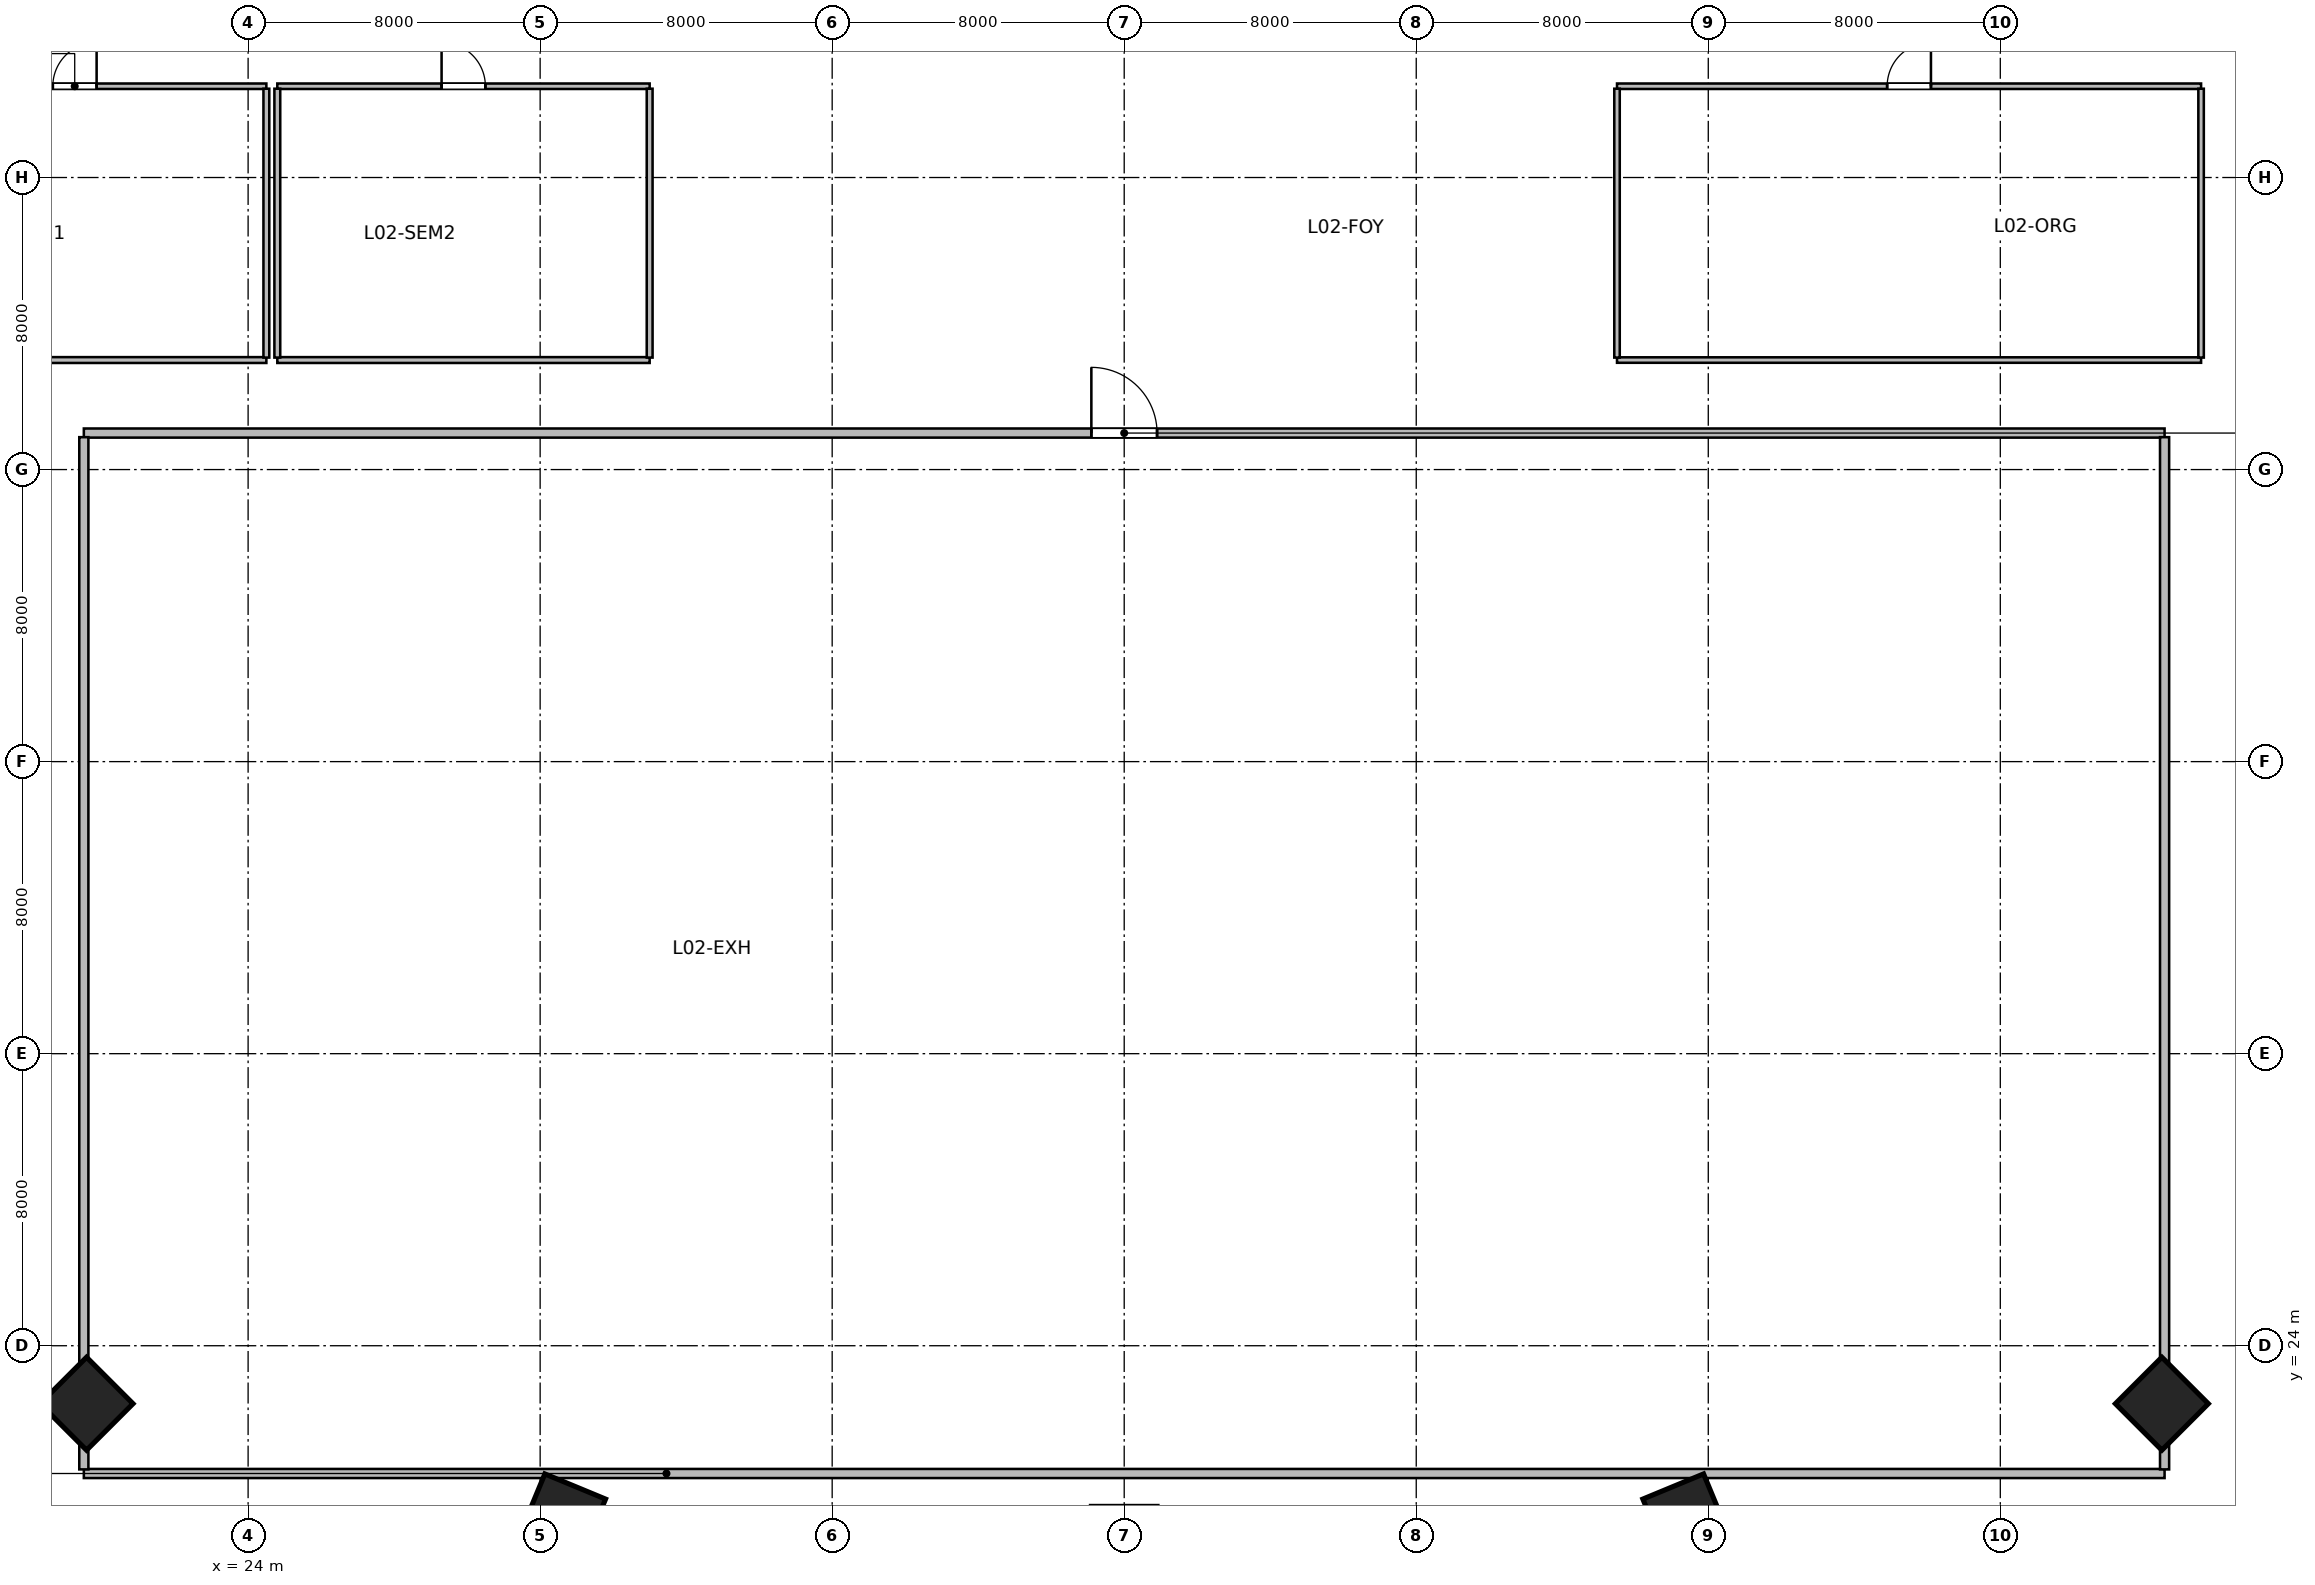
"""IFC4 building model, lengths in metres.
Left out: names, types, materials, properties, quantities, classifications, styles, units other than length and angle.
Written with IfcOpenShell. Run it as: python <this file> out.ifc"""

import sys

from ifc_helpers import new_model, si_unit, direction, frame, frame_2d, origin, origin_2d, place, context, subcontext, project, spatial, rectangle, extrude, source, transform, mapped, element, fill, save


model = new_model("IFC4")
c1 = context("Model", 3, precision=1e-05, world=origin(), true_north=direction((0.0, 1.0)))
c2 = subcontext(c1, "Body", "Model", "MODEL_VIEW")
j1 = project(units=[si_unit("LENGTHUNIT", "METRE"), si_unit("PLANEANGLEUNIT", "RADIAN")], contexts=[c1])
p1 = place(None, origin())
s1 = spatial("IfcSite", under=j1, at=p1, CompositionType="ELEMENT")
p2 = place(p1, origin())
s2 = spatial("IfcBuilding", under=s1, at=p2, CompositionType="ELEMENT")
p3 = place(p2, frame((0.0, 0.0, 12.0)))
s3 = spatial("IfcBuildingStorey", under=s2, at=p3, CompositionType="ELEMENT", Elevation=12.0)
m1 = source(origin(), c2, "Body", "SweptSolid", [
    extrude(rectangle(XDim=1.8, YDim=1.8, at=origin_2d()), origin(), (0.0, 0.0, 1.0), 6.0),
])
for number, where, z_axis, x_axis in (
    (1, (19.574, 22.412, 0.0), (0.0, 0.0, 1.0), (-0.707, -0.707, 0.0)),
    (2, (32.616, 19.312, 0.0), (0.0, 0.0, 1.0), (-0.383, -0.924, 0.0)),
    (3, (63.384, 19.312, 0.0), (0.0, 0.0, 1.0), (0.383, -0.924, 0.0)),
    (4, (76.426, 22.412, 0.0), (0.0, 0.0, 1.0), (0.707, -0.707, 0.0)),
):
    element("IfcColumn", number, at=place(p3, frame(where, z_axis=z_axis, x_axis=x_axis)), inside=s3, PredefinedType="COLUMN", context=c2, shape_type="MappedRepresentation", body=[
        mapped(m1, transform((0.0, 0.0, 0.0), scale=1.0)),
    ])
m2 = source(origin(), c2, "Body", "SweptSolid", [
    extrude(rectangle(XDim=57.0, YDim=0.25, at=frame_2d((28.5, 0.0))), origin(), (0.0, 0.0, 1.0), 4.761),
])
p4 = place(p3, frame((19.5, 20.5, 0.0), z_axis=(0.0, 0.0, 1.0), x_axis=(1.0, 0.0, 0.0)))
e5 = element("IfcWall", 5, at=p4, inside=s3, PredefinedType="PARTITIONING", context=c2, shape_type="MappedRepresentation", body=[
    mapped(m2, transform((0.0, 0.0, 0.0), scale=1.0)),
])
m3 = source(origin(), c2, "Body", "SweptSolid", [
    extrude(rectangle(XDim=57.0, YDim=0.25, at=frame_2d((28.5, 0.0))), origin(), (0.0, 0.0, 1.0), 5.7),
])
p5 = place(p3, frame((19.5, 49.0, 0.0), z_axis=(0.0, 0.0, 1.0), x_axis=(1.0, 0.0, 0.0)))
e6 = element("IfcWall", 6, at=p5, inside=s3, PredefinedType="PARTITIONING", context=c2, shape_type="MappedRepresentation", body=[
    mapped(m3, transform((0.0, 0.0, 0.0), scale=1.0)),
])
p6 = place(p5, frame((27.6, 0.0, 0.0)))
e7 = element("IfcOpeningElement", 7, at=p6, cuts=e6, PredefinedType="OPENING", context=c2, shape_type="SweptSolid", body=[
    extrude(rectangle(XDim=1.8, YDim=2.15, at=frame_2d((0.9, 1.075))), frame((0.0, 0.135, 0.0), z_axis=(0.0, -1.0, 0.0), x_axis=(1.0, 0.0, 0.0)), (0.0, 0.0, 1.0), 0.27),
])
m4 = source(origin(), c2, "Body", "SweptSolid", [
    extrude(rectangle(XDim=28.275, YDim=0.25, at=frame_2d((14.137, 0.0))), origin(), (0.0, 0.0, 1.0), 5.7),
])
for number, where, z_axis, x_axis in (
    (8, (19.5, 20.613, 0.0), (0.0, 0.0, 1.0), (0.0, 1.0, 0.0)),
    (9, (76.5, 20.613, 0.0), (0.0, 0.0, 1.0), (0.0, 1.0, 0.0)),
):
    element("IfcWall", number, at=place(p3, frame(where, z_axis=z_axis, x_axis=x_axis)), inside=s3, PredefinedType="PARTITIONING", context=c2, shape_type="MappedRepresentation", body=[
        mapped(m4, transform((0.0, 0.0, 0.0), scale=1.0)),
    ])
m5 = source(origin(), c2, "Body", "SweptSolid", [
    extrude(rectangle(XDim=10.5, YDim=0.16, at=frame_2d((5.25, 0.0))), origin(), (0.0, 0.0, 1.0), 5.7),
])
p7 = place(p3, frame((14.0, 51.0, 0.0), z_axis=(0.0, 0.0, 1.0), x_axis=(1.0, 0.0, 0.0)))
e10 = element("IfcWall", 10, at=p7, inside=s3, PredefinedType="MOVABLE", context=c2, shape_type="MappedRepresentation", body=[
    mapped(m5, transform((0.0, 0.0, 0.0), scale=1.0)),
])
m6 = source(origin(), c2, "Body", "SweptSolid", [
    extrude(rectangle(XDim=10.5, YDim=0.15, at=frame_2d((5.25, 0.0))), origin(), (0.0, 0.0, 1.0), 5.7),
])
p8 = place(p3, frame((14.0, 58.5, 0.0), z_axis=(0.0, 0.0, 1.0), x_axis=(1.0, 0.0, 0.0)))
e11 = element("IfcWall", 11, at=p8, inside=s3, PredefinedType="PARTITIONING", context=c2, shape_type="MappedRepresentation", body=[
    mapped(m6, transform((0.0, 0.0, 0.0), scale=1.0)),
])
p9 = place(p8, frame((4.65, 0.0, 0.0)))
e12 = element("IfcOpeningElement", 12, at=p9, cuts=e11, PredefinedType="OPENING", context=c2, shape_type="SweptSolid", body=[
    extrude(rectangle(XDim=1.2, YDim=2.15, at=frame_2d((0.6, 1.075))), frame((0.0, 0.085, 0.0), z_axis=(0.0, -1.0, 0.0), x_axis=(1.0, 0.0, 0.0)), (0.0, 0.0, 1.0), 0.17),
])
m7 = source(origin(), c2, "Body", "SweptSolid", [
    extrude(rectangle(XDim=7.365, YDim=0.16, at=frame_2d((3.683, 0.0))), origin(), (0.0, 0.0, 1.0), 5.7),
])
p10 = place(p3, frame((24.5, 51.067, 0.0), z_axis=(0.0, 0.0, 1.0), x_axis=(0.0, 1.0, 0.0)))
e13 = element("IfcWall", 13, at=p10, inside=s3, PredefinedType="MOVABLE", context=c2, shape_type="MappedRepresentation", body=[
    mapped(m7, transform((0.0, 0.0, 0.0), scale=1.0)),
])
m8 = source(origin(), c2, "Body", "SweptSolid", [
    extrude(rectangle(XDim=10.2, YDim=0.16, at=frame_2d((5.1, 0.0))), origin(), (0.0, 0.0, 1.0), 5.7),
])
p11 = place(p3, frame((24.8, 51.0, 0.0), z_axis=(0.0, 0.0, 1.0), x_axis=(1.0, 0.0, 0.0)))
e14 = element("IfcWall", 14, at=p11, inside=s3, PredefinedType="MOVABLE", context=c2, shape_type="MappedRepresentation", body=[
    mapped(m8, transform((0.0, 0.0, 0.0), scale=1.0)),
])
m9 = source(origin(), c2, "Body", "SweptSolid", [
    extrude(rectangle(XDim=10.2, YDim=0.15, at=frame_2d((5.1, 0.0))), origin(), (0.0, 0.0, 1.0), 4.834),
])
p12 = place(p3, frame((24.8, 58.5, 0.0), z_axis=(0.0, 0.0, 1.0), x_axis=(1.0, 0.0, 0.0)))
e15 = element("IfcWall", 15, at=p12, inside=s3, PredefinedType="PARTITIONING", context=c2, shape_type="MappedRepresentation", body=[
    mapped(m9, transform((0.0, 0.0, 0.0), scale=1.0)),
])
p13 = place(p12, frame((4.5, 0.0, 0.0)))
e16 = element("IfcOpeningElement", 16, at=p13, cuts=e15, PredefinedType="OPENING", context=c2, shape_type="SweptSolid", body=[
    extrude(rectangle(XDim=1.2, YDim=2.15, at=frame_2d((0.6, 1.075))), frame((0.0, 0.085, 0.0), z_axis=(0.0, -1.0, 0.0), x_axis=(1.0, 0.0, 0.0)), (0.0, 0.0, 1.0), 0.17),
])
p14 = place(p3, frame((24.8, 51.067, 0.0), z_axis=(0.0, 0.0, 1.0), x_axis=(0.0, 1.0, 0.0)))
e17 = element("IfcWall", 17, at=p14, inside=s3, PredefinedType="MOVABLE", context=c2, shape_type="MappedRepresentation", body=[
    mapped(m7, transform((0.0, 0.0, 0.0), scale=1.0)),
])
m10 = source(origin(), c2, "Body", "SweptSolid", [
    extrude(rectangle(XDim=7.365, YDim=0.16, at=frame_2d((3.683, 0.0))), origin(), (0.0, 0.0, 1.0), 4.834),
])
p15 = place(p3, frame((35.0, 51.067, 0.0), z_axis=(0.0, 0.0, 1.0), x_axis=(0.0, 1.0, 0.0)))
e18 = element("IfcWall", 18, at=p15, inside=s3, PredefinedType="MOVABLE", context=c2, shape_type="MappedRepresentation", body=[
    mapped(m10, transform((0.0, 0.0, 0.0), scale=1.0)),
])
m11 = source(origin(), c2, "Body", "SweptSolid", [
    extrude(rectangle(XDim=16.0, YDim=0.15, at=frame_2d((8.0, 0.0))), origin(), (0.0, 0.0, 1.0), 5.7),
])
p16 = place(p3, frame((61.5, 51.0, 0.0), z_axis=(0.0, 0.0, 1.0), x_axis=(1.0, 0.0, 0.0)))
e19 = element("IfcWall", 19, at=p16, inside=s3, PredefinedType="PARTITIONING", context=c2, shape_type="MappedRepresentation", body=[
    mapped(m11, transform((0.0, 0.0, 0.0), scale=1.0)),
])
m12 = source(origin(), c2, "Body", "SweptSolid", [
    extrude(rectangle(XDim=16.0, YDim=0.15, at=frame_2d((8.0, 0.0))), origin(), (0.0, 0.0, 1.0), 4.834),
])
p17 = place(p3, frame((61.5, 58.5, 0.0), z_axis=(0.0, 0.0, 1.0), x_axis=(1.0, 0.0, 0.0)))
e20 = element("IfcWall", 20, at=p17, inside=s3, PredefinedType="PARTITIONING", context=c2, shape_type="MappedRepresentation", body=[
    mapped(m12, transform((0.0, 0.0, 0.0), scale=1.0)),
])
p18 = place(p17, frame((7.4, 0.0, 0.0)))
e21 = element("IfcOpeningElement", 21, at=p18, cuts=e20, PredefinedType="OPENING", context=c2, shape_type="SweptSolid", body=[
    extrude(rectangle(XDim=1.2, YDim=2.15, at=frame_2d((0.6, 1.075))), frame((0.0, 0.085, 0.0), z_axis=(0.0, -1.0, 0.0), x_axis=(1.0, 0.0, 0.0)), (0.0, 0.0, 1.0), 0.17),
])
m13 = source(origin(), c2, "Body", "SweptSolid", [
    extrude(rectangle(XDim=7.365, YDim=0.15, at=frame_2d((3.683, 0.0))), origin(), (0.0, 0.0, 1.0), 4.834),
])
p19 = place(p3, frame((61.5, 51.067, 0.0), z_axis=(0.0, 0.0, 1.0), x_axis=(0.0, 1.0, 0.0)))
e22 = element("IfcWall", 22, at=p19, inside=s3, PredefinedType="PARTITIONING", context=c2, shape_type="MappedRepresentation", body=[
    mapped(m13, transform((0.0, 0.0, 0.0), scale=1.0)),
])
m14 = source(origin(), c2, "Body", "SweptSolid", [
    extrude(rectangle(XDim=7.365, YDim=0.15, at=frame_2d((3.683, 0.0))), origin(), (0.0, 0.0, 1.0), 5.7),
])
p20 = place(p3, frame((77.5, 51.067, 0.0), z_axis=(0.0, 0.0, 1.0), x_axis=(0.0, 1.0, 0.0)))
e23 = element("IfcWall", 23, at=p20, inside=s3, PredefinedType="PARTITIONING", context=c2, shape_type="MappedRepresentation", body=[
    mapped(m14, transform((0.0, 0.0, 0.0), scale=1.0)),
])
m15 = source(origin(), c2, "Body", "SweptSolid", [
    extrude(rectangle(XDim=1.8, YDim=2.15, at=frame_2d((0.9, 1.075))), frame((0.0, 0.025, 0.0), z_axis=(0.0, -1.0, 0.0), x_axis=(1.0, 0.0, 0.0)), (0.0, 0.0, 1.0), 0.05),
])
p21 = place(p6, origin())
e24 = element("IfcDoor", 24, at=p21, inside=s3, OperationType="SINGLE_SWING_LEFT", PredefinedType="DOOR", context=c2, shape_type="MappedRepresentation", body=[
    mapped(m15, transform((0.0, 0.0, 0.0), scale=1.0)),
])
fill(e7, e24)
m16 = source(origin(), c2, "Body", "SweptSolid", [
    extrude(rectangle(XDim=1.2, YDim=2.15, at=frame_2d((0.6, 1.075))), frame((0.0, 0.025, 0.0), z_axis=(0.0, -1.0, 0.0), x_axis=(1.0, 0.0, 0.0)), (0.0, 0.0, 1.0), 0.05),
])
p22 = place(p9, origin())
e25 = element("IfcDoor", 25, at=p22, inside=s3, OperationType="SINGLE_SWING_RIGHT", PredefinedType="DOOR", context=c2, shape_type="MappedRepresentation", body=[
    mapped(m16, transform((0.0, 0.0, 0.0), scale=1.0)),
])
fill(e12, e25)
p23 = place(p13, origin())
e26 = element("IfcDoor", 26, at=p23, inside=s3, OperationType="SINGLE_SWING_LEFT", PredefinedType="DOOR", context=c2, shape_type="MappedRepresentation", body=[
    mapped(m16, transform((0.0, 0.0, 0.0), scale=1.0)),
])
fill(e16, e26)
p24 = place(p18, origin())
e27 = element("IfcDoor", 27, at=p24, inside=s3, OperationType="SINGLE_SWING_RIGHT", PredefinedType="DOOR", context=c2, shape_type="MappedRepresentation", body=[
    mapped(m16, transform((0.0, 0.0, 0.0), scale=1.0)),
])
fill(e21, e27)
save(model, sys.argv[1])
